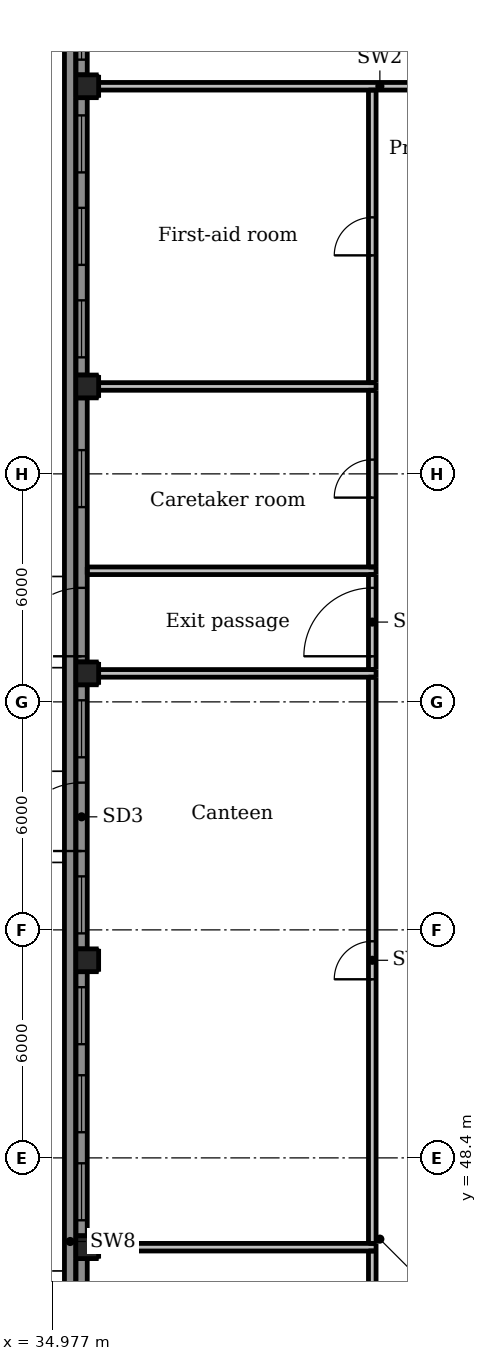
"""IFC4 building model, lengths in metres.
Left out: names, types, materials, properties, quantities, classifications, styles, units other than length and angle.
Written with IfcOpenShell. Run it as: python <this file> out.ifc"""

import sys

from ifc_helpers import new_model, si_unit, direction, frame, frame_2d, origin, origin_2d, place, context, subcontext, project, spatial, rectangle, extrude, element, fill, save


model = new_model("IFC4")
c1 = context("Model", 3, precision=1e-05, world=origin(), true_north=direction((0.0, 1.0)))
c2 = subcontext(c1, "Body", "Model", "MODEL_VIEW")
j1 = project(units=[si_unit("LENGTHUNIT", "METRE"), si_unit("PLANEANGLEUNIT", "RADIAN")], contexts=[c1])
p1 = place(None, origin())
s1 = spatial("IfcSite", under=j1, at=p1, CompositionType="ELEMENT")
p2 = place(p1, origin())
s2 = spatial("IfcBuilding", under=s1, at=p2, CompositionType="ELEMENT")
p3 = place(p2, origin())
s3 = spatial("IfcBuildingStorey", under=s2, at=p3, CompositionType="ELEMENT", Elevation=0.0)
for number, where, z_axis, x_axis in (
    (1, (35.9, 46.05, -0.3), (0.0, 0.0, 1.0), (1.0, 0.0, 0.0)),
    (2, (35.9, 53.6, -0.3), (0.0, 0.0, 1.0), (1.0, 0.0, 0.0)),
    (3, (35.9, 61.15, -0.3), (0.0, 0.0, 1.0), (1.0, 0.0, 0.0)),
    (4, (35.9, 68.7, -0.3), (0.0, 0.0, 1.0), (1.0, 0.0, 0.0)),
    (5, (35.9, 76.6, -0.3), (0.0, 0.0, 1.0), (1.0, 0.0, 0.0)),
):
    element("IfcColumn", number, at=place(p3, frame(where, z_axis=z_axis, x_axis=x_axis)), inside=s3, PredefinedType="COLUMN", context=c2, shape_type="SweptSolid", body=[
        extrude(rectangle(XDim=0.6, YDim=0.6, at=origin_2d()), origin(), (0.0, 0.0, 1.0), 5.5),
    ])
p4 = place(p3, frame((35.75, 38.8, 0.0), z_axis=(0.0, 0.0, 1.0), x_axis=(0.0, 1.0, 0.0)))
e6 = element("IfcWall", 6, at=p4, inside=s3, PredefinedType="SOLIDWALL", context=c2, shape_type="SweptSolid", body=[
    extrude(rectangle(XDim=6.95, YDim=0.3, at=frame_2d((3.475, 0.0))), origin(), (0.0, 0.0, 1.0), 4.3),
])
p5 = place(p4, frame((0.15, 0.0, 0.0)))
e7 = element("IfcOpeningElement", 7, at=p5, cuts=e6, PredefinedType="OPENING", context=c2, shape_type="SweptSolid", body=[
    extrude(rectangle(XDim=1.8, YDim=2.1, at=frame_2d((0.9, 1.05))), frame((0.0, 0.16, 0.0), z_axis=(0.0, -1.0, 0.0), x_axis=(1.0, 0.0, 0.0)), (0.0, 0.0, 1.0), 0.32),
])
p6 = place(p4, frame((3.325, 0.0, 0.0)))
e8 = element("IfcOpeningElement", 8, at=p6, cuts=e6, PredefinedType="OPENING", context=c2, shape_type="SweptSolid", body=[
    extrude(rectangle(XDim=3.0, YDim=2.0, at=frame_2d((1.5, 1.0))), frame((0.0, 0.16, 0.0), z_axis=(0.0, -1.0, 0.0), x_axis=(1.0, 0.0, 0.0)), (0.0, 0.0, 1.0), 0.32),
])
p7 = place(p3, frame((35.75, 46.35, 0.0), z_axis=(0.0, 0.0, 1.0), x_axis=(0.0, 1.0, 0.0)))
e9 = element("IfcWall", 9, at=p7, inside=s3, PredefinedType="SOLIDWALL", context=c2, shape_type="SweptSolid", body=[
    extrude(rectangle(XDim=6.95, YDim=0.3, at=frame_2d((3.475, 0.0))), origin(), (0.0, 0.0, 1.0), 4.3),
])
p8 = place(p7, frame((0.408, 0.0, 0.9)))
e10 = element("IfcOpeningElement", 10, at=p8, cuts=e9, PredefinedType="OPENING", context=c2, shape_type="SweptSolid", body=[
    extrude(rectangle(XDim=1.5, YDim=1.5, at=frame_2d((0.75, 0.75))), frame((0.0, 0.16, 0.0), z_axis=(0.0, -1.0, 0.0), x_axis=(1.0, 0.0, 0.0)), (0.0, 0.0, 1.0), 0.32),
])
p9 = place(p7, frame((2.725, 0.0, 0.9)))
e11 = element("IfcOpeningElement", 11, at=p9, cuts=e9, PredefinedType="OPENING", context=c2, shape_type="SweptSolid", body=[
    extrude(rectangle(XDim=1.5, YDim=1.5, at=frame_2d((0.75, 0.75))), frame((0.0, 0.16, 0.0), z_axis=(0.0, -1.0, 0.0), x_axis=(1.0, 0.0, 0.0)), (0.0, 0.0, 1.0), 0.32),
])
p10 = place(p7, frame((5.042, 0.0, 0.9)))
e12 = element("IfcOpeningElement", 12, at=p10, cuts=e9, PredefinedType="OPENING", context=c2, shape_type="SweptSolid", body=[
    extrude(rectangle(XDim=1.5, YDim=1.5, at=frame_2d((0.75, 0.75))), frame((0.0, 0.16, 0.0), z_axis=(0.0, -1.0, 0.0), x_axis=(1.0, 0.0, 0.0)), (0.0, 0.0, 1.0), 0.32),
])
p11 = place(p3, frame((35.75, 53.9, 0.0), z_axis=(0.0, 0.0, 1.0), x_axis=(0.0, 1.0, 0.0)))
e13 = element("IfcWall", 13, at=p11, inside=s3, PredefinedType="SOLIDWALL", context=c2, shape_type="SweptSolid", body=[
    extrude(rectangle(XDim=6.95, YDim=0.3, at=frame_2d((3.475, 0.0))), origin(), (0.0, 0.0, 1.0), 4.3),
])
p12 = place(p11, frame((2.575, 0.0, 0.0)))
e14 = element("IfcOpeningElement", 14, at=p12, cuts=e13, PredefinedType="OPENING", context=c2, shape_type="SweptSolid", body=[
    extrude(rectangle(XDim=1.8, YDim=2.1, at=frame_2d((0.9, 1.05))), frame((0.0, 0.16, 0.0), z_axis=(0.0, -1.0, 0.0), x_axis=(1.0, 0.0, 0.0)), (0.0, 0.0, 1.0), 0.32),
])
p13 = place(p11, frame((0.408, 0.0, 0.9)))
e15 = element("IfcOpeningElement", 15, at=p13, cuts=e13, PredefinedType="OPENING", context=c2, shape_type="SweptSolid", body=[
    extrude(rectangle(XDim=1.5, YDim=1.5, at=frame_2d((0.75, 0.75))), frame((0.0, 0.16, 0.0), z_axis=(0.0, -1.0, 0.0), x_axis=(1.0, 0.0, 0.0)), (0.0, 0.0, 1.0), 0.32),
])
p14 = place(p11, frame((5.042, 0.0, 0.9)))
e16 = element("IfcOpeningElement", 16, at=p14, cuts=e13, PredefinedType="OPENING", context=c2, shape_type="SweptSolid", body=[
    extrude(rectangle(XDim=1.5, YDim=1.5, at=frame_2d((0.75, 0.75))), frame((0.0, 0.16, 0.0), z_axis=(0.0, -1.0, 0.0), x_axis=(1.0, 0.0, 0.0)), (0.0, 0.0, 1.0), 0.32),
])
p15 = place(p3, frame((35.75, 61.45, 0.0), z_axis=(0.0, 0.0, 1.0), x_axis=(0.0, 1.0, 0.0)))
e17 = element("IfcWall", 17, at=p15, inside=s3, PredefinedType="SOLIDWALL", context=c2, shape_type="SweptSolid", body=[
    extrude(rectangle(XDim=6.95, YDim=0.3, at=frame_2d((3.475, 0.0))), origin(), (0.0, 0.0, 1.0), 4.3),
])
p16 = place(p15, frame((0.15, 0.0, 0.0)))
e18 = element("IfcOpeningElement", 18, at=p16, cuts=e17, PredefinedType="OPENING", context=c2, shape_type="SweptSolid", body=[
    extrude(rectangle(XDim=1.8, YDim=2.1, at=frame_2d((0.9, 1.05))), frame((0.0, 0.16, 0.0), z_axis=(0.0, -1.0, 0.0), x_axis=(1.0, 0.0, 0.0)), (0.0, 0.0, 1.0), 0.32),
])
p17 = place(p15, frame((4.075, 0.0, 0.9)))
e19 = element("IfcOpeningElement", 19, at=p17, cuts=e17, PredefinedType="OPENING", context=c2, shape_type="SweptSolid", body=[
    extrude(rectangle(XDim=1.5, YDim=1.5, at=frame_2d((0.75, 0.75))), frame((0.0, 0.16, 0.0), z_axis=(0.0, -1.0, 0.0), x_axis=(1.0, 0.0, 0.0)), (0.0, 0.0, 1.0), 0.32),
])
p18 = place(p3, frame((35.75, 69.0, 0.0), z_axis=(0.0, 0.0, 1.0), x_axis=(0.0, 1.0, 0.0)))
e20 = element("IfcWall", 20, at=p18, inside=s3, PredefinedType="SOLIDWALL", context=c2, shape_type="SweptSolid", body=[
    extrude(rectangle(XDim=7.3, YDim=0.3, at=frame_2d((3.65, 0.0))), origin(), (0.0, 0.0, 1.0), 4.3),
])
p19 = place(p18, frame((0.467, 0.0, 0.9)))
e21 = element("IfcOpeningElement", 21, at=p19, cuts=e20, PredefinedType="OPENING", context=c2, shape_type="SweptSolid", body=[
    extrude(rectangle(XDim=1.5, YDim=1.5, at=frame_2d((0.75, 0.75))), frame((0.0, 0.16, 0.0), z_axis=(0.0, -1.0, 0.0), x_axis=(1.0, 0.0, 0.0)), (0.0, 0.0, 1.0), 0.32),
])
p20 = place(p18, frame((2.9, 0.0, 0.9)))
e22 = element("IfcOpeningElement", 22, at=p20, cuts=e20, PredefinedType="OPENING", context=c2, shape_type="SweptSolid", body=[
    extrude(rectangle(XDim=1.5, YDim=1.5, at=frame_2d((0.75, 0.75))), frame((0.0, 0.16, 0.0), z_axis=(0.0, -1.0, 0.0), x_axis=(1.0, 0.0, 0.0)), (0.0, 0.0, 1.0), 0.32),
])
p21 = place(p18, frame((5.333, 0.0, 0.9)))
e23 = element("IfcOpeningElement", 23, at=p21, cuts=e20, PredefinedType="OPENING", context=c2, shape_type="SweptSolid", body=[
    extrude(rectangle(XDim=1.5, YDim=1.5, at=frame_2d((0.75, 0.75))), frame((0.0, 0.16, 0.0), z_axis=(0.0, -1.0, 0.0), x_axis=(1.0, 0.0, 0.0)), (0.0, 0.0, 1.0), 0.32),
])
p22 = place(p3, frame((35.75, 76.9, 0.0), z_axis=(0.0, 0.0, 1.0), x_axis=(0.0, 1.0, 0.0)))
e24 = element("IfcWall", 24, at=p22, inside=s3, PredefinedType="SOLIDWALL", context=c2, shape_type="SweptSolid", body=[
    extrude(rectangle(XDim=6.9, YDim=0.3, at=frame_2d((3.45, 0.0))), origin(), (0.0, 0.0, 1.0), 4.3),
])
p23 = place(p22, frame((0.4, 0.0, 0.9)))
e25 = element("IfcOpeningElement", 25, at=p23, cuts=e24, PredefinedType="OPENING", context=c2, shape_type="SweptSolid", body=[
    extrude(rectangle(XDim=1.5, YDim=1.5, at=frame_2d((0.75, 0.75))), frame((0.0, 0.16, 0.0), z_axis=(0.0, -1.0, 0.0), x_axis=(1.0, 0.0, 0.0)), (0.0, 0.0, 1.0), 0.32),
])
p24 = place(p22, frame((2.7, 0.0, 0.9)))
e26 = element("IfcOpeningElement", 26, at=p24, cuts=e24, PredefinedType="OPENING", context=c2, shape_type="SweptSolid", body=[
    extrude(rectangle(XDim=1.5, YDim=1.5, at=frame_2d((0.75, 0.75))), frame((0.0, 0.16, 0.0), z_axis=(0.0, -1.0, 0.0), x_axis=(1.0, 0.0, 0.0)), (0.0, 0.0, 1.0), 0.32),
])
p25 = place(p22, frame((5.0, 0.0, 0.9)))
e27 = element("IfcOpeningElement", 27, at=p25, cuts=e24, PredefinedType="OPENING", context=c2, shape_type="SweptSolid", body=[
    extrude(rectangle(XDim=1.5, YDim=1.5, at=frame_2d((0.75, 0.75))), frame((0.0, 0.16, 0.0), z_axis=(0.0, -1.0, 0.0), x_axis=(1.0, 0.0, 0.0)), (0.0, 0.0, 1.0), 0.32),
])
p26 = place(p3, frame((35.45, 8.0, -0.3), z_axis=(0.0, 0.0, 1.0), x_axis=(0.0, 1.0, 0.0)))
e28 = element("IfcWall", 28, at=p26, inside=s3, PredefinedType="SOLIDWALL", context=c2, shape_type="SweptSolid", body=[
    extrude(rectangle(XDim=76.4, YDim=0.3, at=frame_2d((38.2, 0.0))), origin(), (0.0, 0.0, 1.0), 0.3),
])
p27 = place(p3, frame((43.4, 41.3, 0.0), z_axis=(0.0, 0.0, 1.0), x_axis=(0.0, 1.0, 0.0)))
e29 = element("IfcWall", 29, at=p27, inside=s3, PredefinedType="PARTITIONING", context=c2, shape_type="SweptSolid", body=[
    extrude(rectangle(XDim=4.65, YDim=0.2, at=frame_2d((2.325, 0.0))), origin(), (0.0, 0.0, 1.0), 4.1),
])
p28 = place(p27, frame((1.825, 0.0, 0.0)))
e30 = element("IfcOpeningElement", 30, at=p28, cuts=e29, PredefinedType="OPENING", context=c2, shape_type="SweptSolid", body=[
    extrude(rectangle(XDim=1.0, YDim=2.1, at=frame_2d((0.5, 1.05))), frame((0.0, 0.11, 0.0), z_axis=(0.0, -1.0, 0.0), x_axis=(1.0, 0.0, 0.0)), (0.0, 0.0, 1.0), 0.22),
])
p29 = place(p3, frame((43.4, 46.15, 0.0), z_axis=(0.0, 0.0, 1.0), x_axis=(0.0, 1.0, 0.0)))
e31 = element("IfcWall", 31, at=p29, inside=s3, PredefinedType="PARTITIONING", context=c2, shape_type="SweptSolid", body=[
    extrude(rectangle(XDim=14.9, YDim=0.2, at=frame_2d((7.45, 0.0))), origin(), (0.0, 0.0, 1.0), 4.1),
])
p30 = place(p29, frame((6.95, 0.0, 0.0)))
e32 = element("IfcOpeningElement", 32, at=p30, cuts=e31, PredefinedType="OPENING", context=c2, shape_type="SweptSolid", body=[
    extrude(rectangle(XDim=1.0, YDim=2.1, at=frame_2d((0.5, 1.05))), frame((0.0, 0.11, 0.0), z_axis=(0.0, -1.0, 0.0), x_axis=(1.0, 0.0, 0.0)), (0.0, 0.0, 1.0), 0.22),
])
p31 = place(p3, frame((43.4, 63.95, 0.0), z_axis=(0.0, 0.0, 1.0), x_axis=(0.0, 1.0, 0.0)))
e33 = element("IfcWall", 33, at=p31, inside=s3, PredefinedType="PARTITIONING", context=c2, shape_type="SweptSolid", body=[
    extrude(rectangle(XDim=4.65, YDim=0.2, at=frame_2d((2.325, 0.0))), origin(), (0.0, 0.0, 1.0), 4.1),
])
p32 = place(p31, frame((1.825, 0.0, 0.0)))
e34 = element("IfcOpeningElement", 34, at=p32, cuts=e33, PredefinedType="OPENING", context=c2, shape_type="SweptSolid", body=[
    extrude(rectangle(XDim=1.0, YDim=2.1, at=frame_2d((0.5, 1.05))), frame((0.0, 0.11, 0.0), z_axis=(0.0, -1.0, 0.0), x_axis=(1.0, 0.0, 0.0)), (0.0, 0.0, 1.0), 0.22),
])
p33 = place(p3, frame((43.4, 68.8, 0.0), z_axis=(0.0, 0.0, 1.0), x_axis=(0.0, 1.0, 0.0)))
e35 = element("IfcWall", 35, at=p33, inside=s3, PredefinedType="PARTITIONING", context=c2, shape_type="SweptSolid", body=[
    extrude(rectangle(XDim=7.7, YDim=0.2, at=frame_2d((3.85, 0.0))), origin(), (0.0, 0.0, 1.0), 4.1),
])
p34 = place(p33, frame((3.35, 0.0, 0.0)))
e36 = element("IfcOpeningElement", 36, at=p34, cuts=e35, PredefinedType="OPENING", context=c2, shape_type="SweptSolid", body=[
    extrude(rectangle(XDim=1.0, YDim=2.1, at=frame_2d((0.5, 1.05))), frame((0.0, 0.11, 0.0), z_axis=(0.0, -1.0, 0.0), x_axis=(1.0, 0.0, 0.0)), (0.0, 0.0, 1.0), 0.22),
])
for number, where, z_axis, x_axis in (
    (37, (36.2, 46.05, 0.0), (0.0, 0.0, 1.0), (1.0, 0.0, 0.0)),
    (38, (36.2, 61.15, 0.0), (0.0, 0.0, 1.0), (1.0, 0.0, 0.0)),
):
    element("IfcWall", number, at=place(p3, frame(where, z_axis=z_axis, x_axis=x_axis)), inside=s3, PredefinedType="PARTITIONING", context=c2, shape_type="SweptSolid", body=[
        extrude(rectangle(XDim=7.3, YDim=0.2, at=frame_2d((3.65, 0.0))), origin(), (0.0, 0.0, 1.0), 4.1),
    ])
p35 = place(p3, frame((35.9, 63.85, 0.0), z_axis=(0.0, 0.0, 1.0), x_axis=(1.0, 0.0, 0.0)))
e39 = element("IfcWall", 39, at=p35, inside=s3, PredefinedType="PARTITIONING", context=c2, shape_type="SweptSolid", body=[
    extrude(rectangle(XDim=7.6, YDim=0.2, at=frame_2d((3.8, 0.0))), origin(), (0.0, 0.0, 1.0), 4.1),
])
p36 = place(p3, frame((36.2, 68.7, 0.0), z_axis=(0.0, 0.0, 1.0), x_axis=(1.0, 0.0, 0.0)))
e40 = element("IfcWall", 40, at=p36, inside=s3, PredefinedType="PARTITIONING", context=c2, shape_type="SweptSolid", body=[
    extrude(rectangle(XDim=7.3, YDim=0.2, at=frame_2d((3.65, 0.0))), origin(), (0.0, 0.0, 1.0), 4.1),
])
p37 = place(p3, frame((36.2, 76.6, 0.0), z_axis=(0.0, 0.0, 1.0), x_axis=(1.0, 0.0, 0.0)))
e41 = element("IfcWall", 41, at=p37, inside=s3, PredefinedType="PARTITIONING", context=c2, shape_type="SweptSolid", body=[
    extrude(rectangle(XDim=14.8, YDim=0.2, at=frame_2d((7.4, 0.0))), origin(), (0.0, 0.0, 1.0), 4.1),
])
p38 = place(p37, frame((11.1, 0.0, 0.0)))
e42 = element("IfcOpeningElement", 42, at=p38, cuts=e41, PredefinedType="OPENING", context=c2, shape_type="SweptSolid", body=[
    extrude(rectangle(XDim=1.0, YDim=2.1, at=frame_2d((0.5, 1.05))), frame((0.0, 0.11, 0.0), z_axis=(0.0, -1.0, 0.0), x_axis=(1.0, 0.0, 0.0)), (0.0, 0.0, 1.0), 0.22),
])
p39 = place(p3, frame((43.4, 61.25, 0.0), z_axis=(0.0, 0.0, 1.0), x_axis=(0.0, 1.0, 0.0)))
e43 = element("IfcWall", 43, at=p39, inside=s3, PredefinedType="PARTITIONING", context=c2, shape_type="SweptSolid", body=[
    extrude(rectangle(XDim=2.5, YDim=0.2, at=frame_2d((1.25, 0.0))), origin(), (0.0, 0.0, 1.0), 4.1),
])
p40 = place(p39, frame((0.35, 0.0, 0.0)))
e44 = element("IfcOpeningElement", 44, at=p40, cuts=e43, PredefinedType="OPENING", context=c2, shape_type="SweptSolid", body=[
    extrude(rectangle(XDim=1.8, YDim=2.1, at=frame_2d((0.9, 1.05))), frame((0.0, 0.11, 0.0), z_axis=(0.0, -1.0, 0.0), x_axis=(1.0, 0.0, 0.0)), (0.0, 0.0, 1.0), 0.22),
])
p41 = place(p8, origin())
e45 = element("IfcWindow", 45, at=p41, inside=s3, PartitioningType="DOUBLE_PANEL_HORIZONTAL", PredefinedType="WINDOW", context=c2, shape_type="SweptSolid", body=[
    extrude(rectangle(XDim=1.5, YDim=1.5, at=frame_2d((0.75, 0.75))), frame((0.0, 0.03, 0.0), z_axis=(0.0, -1.0, 0.0), x_axis=(1.0, 0.0, 0.0)), (0.0, 0.0, 1.0), 0.06),
])
fill(e10, e45)
p42 = place(p9, origin())
e46 = element("IfcWindow", 46, at=p42, inside=s3, PartitioningType="DOUBLE_PANEL_HORIZONTAL", PredefinedType="WINDOW", context=c2, shape_type="SweptSolid", body=[
    extrude(rectangle(XDim=1.5, YDim=1.5, at=frame_2d((0.75, 0.75))), frame((0.0, 0.03, 0.0), z_axis=(0.0, -1.0, 0.0), x_axis=(1.0, 0.0, 0.0)), (0.0, 0.0, 1.0), 0.06),
])
fill(e11, e46)
p43 = place(p10, origin())
e47 = element("IfcWindow", 47, at=p43, inside=s3, PartitioningType="DOUBLE_PANEL_HORIZONTAL", PredefinedType="WINDOW", context=c2, shape_type="SweptSolid", body=[
    extrude(rectangle(XDim=1.5, YDim=1.5, at=frame_2d((0.75, 0.75))), frame((0.0, 0.03, 0.0), z_axis=(0.0, -1.0, 0.0), x_axis=(1.0, 0.0, 0.0)), (0.0, 0.0, 1.0), 0.06),
])
fill(e12, e47)
p44 = place(p12, origin())
e48 = element("IfcDoor", 48, at=p44, inside=s3, OperationType="DOUBLE_DOOR_SINGLE_SWING", PredefinedType="DOOR", context=c2, shape_type="SweptSolid", body=[
    extrude(rectangle(XDim=1.8, YDim=2.1, at=frame_2d((0.9, 1.05))), frame((0.0, 0.025, 0.0), z_axis=(0.0, -1.0, 0.0), x_axis=(1.0, 0.0, 0.0)), (0.0, 0.0, 1.0), 0.05),
])
fill(e14, e48)
p45 = place(p13, origin())
e49 = element("IfcWindow", 49, at=p45, inside=s3, PartitioningType="DOUBLE_PANEL_HORIZONTAL", PredefinedType="WINDOW", context=c2, shape_type="SweptSolid", body=[
    extrude(rectangle(XDim=1.5, YDim=1.5, at=frame_2d((0.75, 0.75))), frame((0.0, 0.03, 0.0), z_axis=(0.0, -1.0, 0.0), x_axis=(1.0, 0.0, 0.0)), (0.0, 0.0, 1.0), 0.06),
])
fill(e15, e49)
p46 = place(p14, origin())
e50 = element("IfcWindow", 50, at=p46, inside=s3, PartitioningType="DOUBLE_PANEL_HORIZONTAL", PredefinedType="WINDOW", context=c2, shape_type="SweptSolid", body=[
    extrude(rectangle(XDim=1.5, YDim=1.5, at=frame_2d((0.75, 0.75))), frame((0.0, 0.03, 0.0), z_axis=(0.0, -1.0, 0.0), x_axis=(1.0, 0.0, 0.0)), (0.0, 0.0, 1.0), 0.06),
])
fill(e16, e50)
p47 = place(p16, origin())
e51 = element("IfcDoor", 51, at=p47, inside=s3, OperationType="DOUBLE_DOOR_SINGLE_SWING", PredefinedType="DOOR", context=c2, shape_type="SweptSolid", body=[
    extrude(rectangle(XDim=1.8, YDim=2.1, at=frame_2d((0.9, 1.05))), frame((0.0, 0.025, 0.0), z_axis=(0.0, -1.0, 0.0), x_axis=(1.0, 0.0, 0.0)), (0.0, 0.0, 1.0), 0.05),
])
fill(e18, e51)
p48 = place(p17, origin())
e52 = element("IfcWindow", 52, at=p48, inside=s3, PartitioningType="DOUBLE_PANEL_HORIZONTAL", PredefinedType="WINDOW", context=c2, shape_type="SweptSolid", body=[
    extrude(rectangle(XDim=1.5, YDim=1.5, at=frame_2d((0.75, 0.75))), frame((0.0, 0.03, 0.0), z_axis=(0.0, -1.0, 0.0), x_axis=(1.0, 0.0, 0.0)), (0.0, 0.0, 1.0), 0.06),
])
fill(e19, e52)
p49 = place(p19, origin())
e53 = element("IfcWindow", 53, at=p49, inside=s3, PartitioningType="DOUBLE_PANEL_HORIZONTAL", PredefinedType="WINDOW", context=c2, shape_type="SweptSolid", body=[
    extrude(rectangle(XDim=1.5, YDim=1.5, at=frame_2d((0.75, 0.75))), frame((0.0, 0.03, 0.0), z_axis=(0.0, -1.0, 0.0), x_axis=(1.0, 0.0, 0.0)), (0.0, 0.0, 1.0), 0.06),
])
fill(e21, e53)
p50 = place(p20, origin())
e54 = element("IfcWindow", 54, at=p50, inside=s3, PartitioningType="DOUBLE_PANEL_HORIZONTAL", PredefinedType="WINDOW", context=c2, shape_type="SweptSolid", body=[
    extrude(rectangle(XDim=1.5, YDim=1.5, at=frame_2d((0.75, 0.75))), frame((0.0, 0.03, 0.0), z_axis=(0.0, -1.0, 0.0), x_axis=(1.0, 0.0, 0.0)), (0.0, 0.0, 1.0), 0.06),
])
fill(e22, e54)
p51 = place(p21, origin())
e55 = element("IfcWindow", 55, at=p51, inside=s3, PartitioningType="DOUBLE_PANEL_HORIZONTAL", PredefinedType="WINDOW", context=c2, shape_type="SweptSolid", body=[
    extrude(rectangle(XDim=1.5, YDim=1.5, at=frame_2d((0.75, 0.75))), frame((0.0, 0.03, 0.0), z_axis=(0.0, -1.0, 0.0), x_axis=(1.0, 0.0, 0.0)), (0.0, 0.0, 1.0), 0.06),
])
fill(e23, e55)
p52 = place(p23, origin())
e56 = element("IfcWindow", 56, at=p52, inside=s3, PartitioningType="DOUBLE_PANEL_HORIZONTAL", PredefinedType="WINDOW", context=c2, shape_type="SweptSolid", body=[
    extrude(rectangle(XDim=1.5, YDim=1.5, at=frame_2d((0.75, 0.75))), frame((0.0, 0.03, 0.0), z_axis=(0.0, -1.0, 0.0), x_axis=(1.0, 0.0, 0.0)), (0.0, 0.0, 1.0), 0.06),
])
fill(e25, e56)
p53 = place(p30, origin())
e57 = element("IfcDoor", 57, at=p53, inside=s3, OperationType="SINGLE_SWING_LEFT", PredefinedType="DOOR", context=c2, shape_type="SweptSolid", body=[
    extrude(rectangle(XDim=1.0, YDim=2.1, at=frame_2d((0.5, 1.05))), frame((0.0, 0.025, 0.0), z_axis=(0.0, -1.0, 0.0), x_axis=(1.0, 0.0, 0.0)), (0.0, 0.0, 1.0), 0.05),
])
fill(e32, e57)
p54 = place(p32, origin())
e58 = element("IfcDoor", 58, at=p54, inside=s3, OperationType="SINGLE_SWING_LEFT", PredefinedType="DOOR", context=c2, shape_type="SweptSolid", body=[
    extrude(rectangle(XDim=1.0, YDim=2.1, at=frame_2d((0.5, 1.05))), frame((0.0, 0.025, 0.0), z_axis=(0.0, -1.0, 0.0), x_axis=(1.0, 0.0, 0.0)), (0.0, 0.0, 1.0), 0.05),
])
fill(e34, e58)
p55 = place(p34, origin())
e59 = element("IfcDoor", 59, at=p55, inside=s3, OperationType="SINGLE_SWING_LEFT", PredefinedType="DOOR", context=c2, shape_type="SweptSolid", body=[
    extrude(rectangle(XDim=1.0, YDim=2.1, at=frame_2d((0.5, 1.05))), frame((0.0, 0.025, 0.0), z_axis=(0.0, -1.0, 0.0), x_axis=(1.0, 0.0, 0.0)), (0.0, 0.0, 1.0), 0.05),
])
fill(e36, e59)
p56 = place(p40, origin())
e60 = element("IfcDoor", 60, at=p56, inside=s3, OperationType="DOUBLE_DOOR_SINGLE_SWING", PredefinedType="DOOR", context=c2, shape_type="SweptSolid", body=[
    extrude(rectangle(XDim=1.8, YDim=2.1, at=frame_2d((0.9, 1.05))), frame((0.0, 0.025, 0.0), z_axis=(0.0, -1.0, 0.0), x_axis=(1.0, 0.0, 0.0)), (0.0, 0.0, 1.0), 0.05),
])
fill(e44, e60)
save(model, sys.argv[1])
